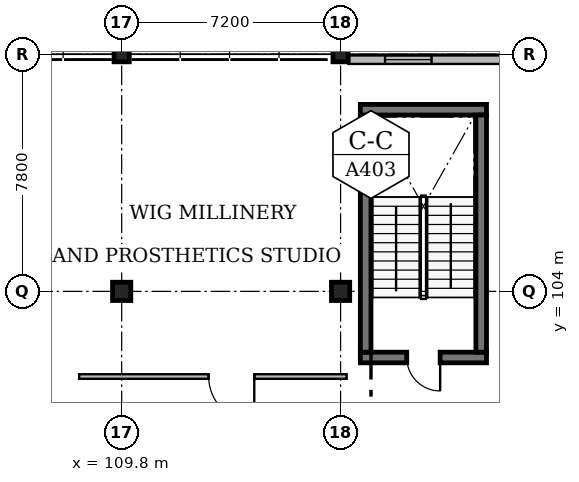
"""IFC4 building model, lengths in metres.
Left out: names, types, materials, properties, quantities, classifications, styles, units other than length and angle.
Written with IfcOpenShell. Run it as: python <this file> out.ifc"""

import sys

from ifc_helpers import new_model, si_unit, direction, frame, frame_2d, origin, origin_2d, place, context, subcontext, project, spatial, rectangle, extrude, element, fill, save


model = new_model("IFC4")
c1 = context("Model", 3, precision=1e-05, world=origin(), true_north=direction((0.0, 1.0)))
c2 = subcontext(c1, "Body", "Model", "MODEL_VIEW")
j1 = project(units=[si_unit("LENGTHUNIT", "METRE"), si_unit("PLANEANGLEUNIT", "RADIAN")], contexts=[c1])
p1 = place(None, origin())
s1 = spatial("IfcSite", under=j1, at=p1, CompositionType="ELEMENT")
p2 = place(p1, origin())
s2 = spatial("IfcBuilding", under=s1, at=p2, CompositionType="ELEMENT")
p3 = place(p2, frame((0.0, 0.0, 9.0)))
s3 = spatial("IfcBuildingStorey", under=s2, at=p3, CompositionType="ELEMENT", Elevation=9.0)
p4 = place(p3, frame((109.8, 104.0, 0.0), z_axis=(0.0, 0.0, 1.0), x_axis=(1.0, 0.0, 0.0)))
e1 = element("IfcColumn", 1, at=p4, inside=s3, PredefinedType="COLUMN", context=c2, shape_type="SweptSolid", body=[
    extrude(rectangle(XDim=0.6, YDim=0.6, at=origin_2d()), origin(), (0.0, 0.0, 1.0), 4.2),
])
p5 = place(p3, frame((109.8, 111.8, 0.0), z_axis=(0.0, 0.0, 1.0), x_axis=(1.0, 0.0, 0.0)))
e2 = element("IfcColumn", 2, at=p5, inside=s3, PredefinedType="COLUMN", context=c2, shape_type="SweptSolid", body=[
    extrude(rectangle(XDim=0.5, YDim=0.5, at=origin_2d()), origin(), (0.0, 0.0, 1.0), 4.2),
])
p6 = place(p3, frame((117.0, 104.0, 0.0), z_axis=(0.0, 0.0, 1.0), x_axis=(1.0, 0.0, 0.0)))
e3 = element("IfcColumn", 3, at=p6, inside=s3, PredefinedType="COLUMN", context=c2, shape_type="SweptSolid", body=[
    extrude(rectangle(XDim=0.6, YDim=0.6, at=origin_2d()), origin(), (0.0, 0.0, 1.0), 4.2),
])
p7 = place(p3, frame((117.0, 111.8, 0.0), z_axis=(0.0, 0.0, 1.0), x_axis=(1.0, 0.0, 0.0)))
e4 = element("IfcColumn", 4, at=p7, inside=s3, PredefinedType="COLUMN", context=c2, shape_type="SweptSolid", body=[
    extrude(rectangle(XDim=0.5, YDim=0.5, at=origin_2d()), origin(), (0.0, 0.0, 1.0), 4.2),
])
p8 = place(p3, frame((121.8, 101.825, 0.0), z_axis=(0.0, 0.0, 1.0), x_axis=(-1.0, 0.0, 0.0)))
e5 = element("IfcWall", 5, at=p8, inside=s3, PredefinedType="SOLIDWALL", context=c2, shape_type="SweptSolid", body=[
    extrude(rectangle(XDim=4.15, YDim=0.35, at=frame_2d((2.075, 0.0))), origin(), (0.0, 0.0, 1.0), 4.2),
])
p9 = place(p8, frame((1.525, 0.0, 0.0)))
e6 = element("IfcOpeningElement", 6, at=p9, cuts=e5, PredefinedType="OPENING", context=c2, shape_type="SweptSolid", body=[
    extrude(rectangle(XDim=1.1, YDim=2.15, at=frame_2d((0.55, 1.075))), frame((0.0, 0.195, 0.0), z_axis=(0.0, -1.0, 0.0), x_axis=(1.0, 0.0, 0.0)), (0.0, 0.0, 1.0), 0.39),
])
p10 = place(p3, frame((117.825, 102.0, 0.0), z_axis=(0.0, 0.0, 1.0), x_axis=(0.0, 1.0, 0.0)))
e7 = element("IfcWall", 7, at=p10, inside=s3, PredefinedType="SOLIDWALL", context=c2, shape_type="SweptSolid", body=[
    extrude(rectangle(XDim=7.8, YDim=0.35, at=frame_2d((3.9, 0.0))), origin(), (0.0, 0.0, 1.0), 4.2),
])
p11 = place(p3, frame((117.65, 109.975, 0.0), z_axis=(0.0, 0.0, 1.0), x_axis=(1.0, 0.0, 0.0)))
e8 = element("IfcWall", 8, at=p11, inside=s3, PredefinedType="SOLIDWALL", context=c2, shape_type="SweptSolid", body=[
    extrude(rectangle(XDim=4.15, YDim=0.35, at=frame_2d((2.075, 0.0))), origin(), (0.0, 0.0, 1.0), 4.2),
])
p12 = place(p3, frame((121.625, 109.8, 0.0), z_axis=(0.0, 0.0, 1.0), x_axis=(0.0, -1.0, 0.0)))
e9 = element("IfcWall", 9, at=p12, inside=s3, PredefinedType="SOLIDWALL", context=c2, shape_type="SweptSolid", body=[
    extrude(rectangle(XDim=7.8, YDim=0.35, at=frame_2d((3.9, 0.0))), origin(), (0.0, 0.0, 1.0), 4.2),
])
p13 = place(p3, frame((117.255, 111.62, 0.0), z_axis=(0.0, 0.0, 1.0), x_axis=(1.0, 0.0, 0.0)))
e10 = element("IfcWall", 10, at=p13, inside=s3, PredefinedType="SOLIDWALL", context=c2, shape_type="SweptSolid", body=[
    extrude(rectangle(XDim=7.89, YDim=0.28, at=frame_2d((3.945, 0.0))), origin(), (0.0, 0.0, 1.0), 3.263),
])
p14 = place(p13, frame((1.208, 0.0, 0.95)))
e11 = element("IfcOpeningElement", 11, at=p14, cuts=e10, PredefinedType="OPENING", context=c2, shape_type="SweptSolid", body=[
    extrude(rectangle(XDim=1.53, YDim=1.75, at=frame_2d((0.765, 0.875))), frame((0.0, 0.16, 0.0), z_axis=(0.0, -1.0, 0.0), x_axis=(1.0, 0.0, 0.0)), (0.0, 0.0, 1.0), 0.32),
])
p15 = place(p13, frame((5.153, 0.0, 0.95)))
e12 = element("IfcOpeningElement", 12, at=p15, cuts=e10, PredefinedType="OPENING", context=c2, shape_type="SweptSolid", body=[
    extrude(rectangle(XDim=1.53, YDim=1.75, at=frame_2d((0.765, 0.875))), frame((0.0, 0.16, 0.0), z_axis=(0.0, -1.0, 0.0), x_axis=(1.0, 0.0, 0.0)), (0.0, 0.0, 1.0), 0.32),
])
p16 = place(p3, frame((117.2, 101.2, 0.0), z_axis=(0.0, 0.0, 1.0), x_axis=(-1.0, 0.0, 0.0)))
e13 = element("IfcWall", 13, at=p16, inside=s3, PredefinedType="PARTITIONING", context=c2, shape_type="SweptSolid", body=[
    extrude(rectangle(XDim=8.8, YDim=0.15, at=frame_2d((4.4, 0.0))), origin(), (0.0, 0.0, 1.0), 3.93),
])
p17 = place(p16, frame((3.039, 0.0, 0.0)))
e14 = element("IfcOpeningElement", 14, at=p17, cuts=e13, PredefinedType="OPENING", context=c2, shape_type="SweptSolid", body=[
    extrude(rectangle(XDim=1.5, YDim=2.25, at=frame_2d((0.75, 1.125))), frame((0.0, 0.095, 0.0), z_axis=(0.0, -1.0, 0.0), x_axis=(1.0, 0.0, 0.0)), (0.0, 0.0, 1.0), 0.19),
])
p18 = place(p9, origin())
e15 = element("IfcDoor", 15, at=p18, inside=s3, OperationType="SINGLE_SWING_LEFT", PredefinedType="DOOR", context=c2, shape_type="SweptSolid", body=[
    extrude(rectangle(XDim=1.1, YDim=2.15, at=frame_2d((0.55, 1.075))), frame((0.0, 0.025, 0.0), z_axis=(0.0, -1.0, 0.0), x_axis=(1.0, 0.0, 0.0)), (0.0, 0.0, 1.0), 0.05),
])
fill(e6, e15)
p19 = place(p14, origin())
e16 = element("IfcWindow", 16, at=p19, inside=s3, PartitioningType="SINGLE_PANEL", PredefinedType="WINDOW", context=c2, shape_type="SweptSolid", body=[
    extrude(rectangle(XDim=1.53, YDim=1.75, at=frame_2d((0.765, 0.875))), frame((0.0, 0.03, 0.0), z_axis=(0.0, -1.0, 0.0), x_axis=(1.0, 0.0, 0.0)), (0.0, 0.0, 1.0), 0.06),
])
fill(e11, e16)
p20 = place(p17, origin())
e17 = element("IfcDoor", 17, at=p20, inside=s3, OperationType="DOUBLE_DOOR_SINGLE_SWING", PredefinedType="DOOR", context=c2, shape_type="SweptSolid", body=[
    extrude(rectangle(XDim=1.5, YDim=2.25, at=frame_2d((0.75, 1.125))), frame((0.0, 0.025, 0.0), z_axis=(0.0, -1.0, 0.0), x_axis=(1.0, 0.0, 0.0)), (0.0, 0.0, 1.0), 0.05),
])
fill(e14, e17)
save(model, sys.argv[1])
